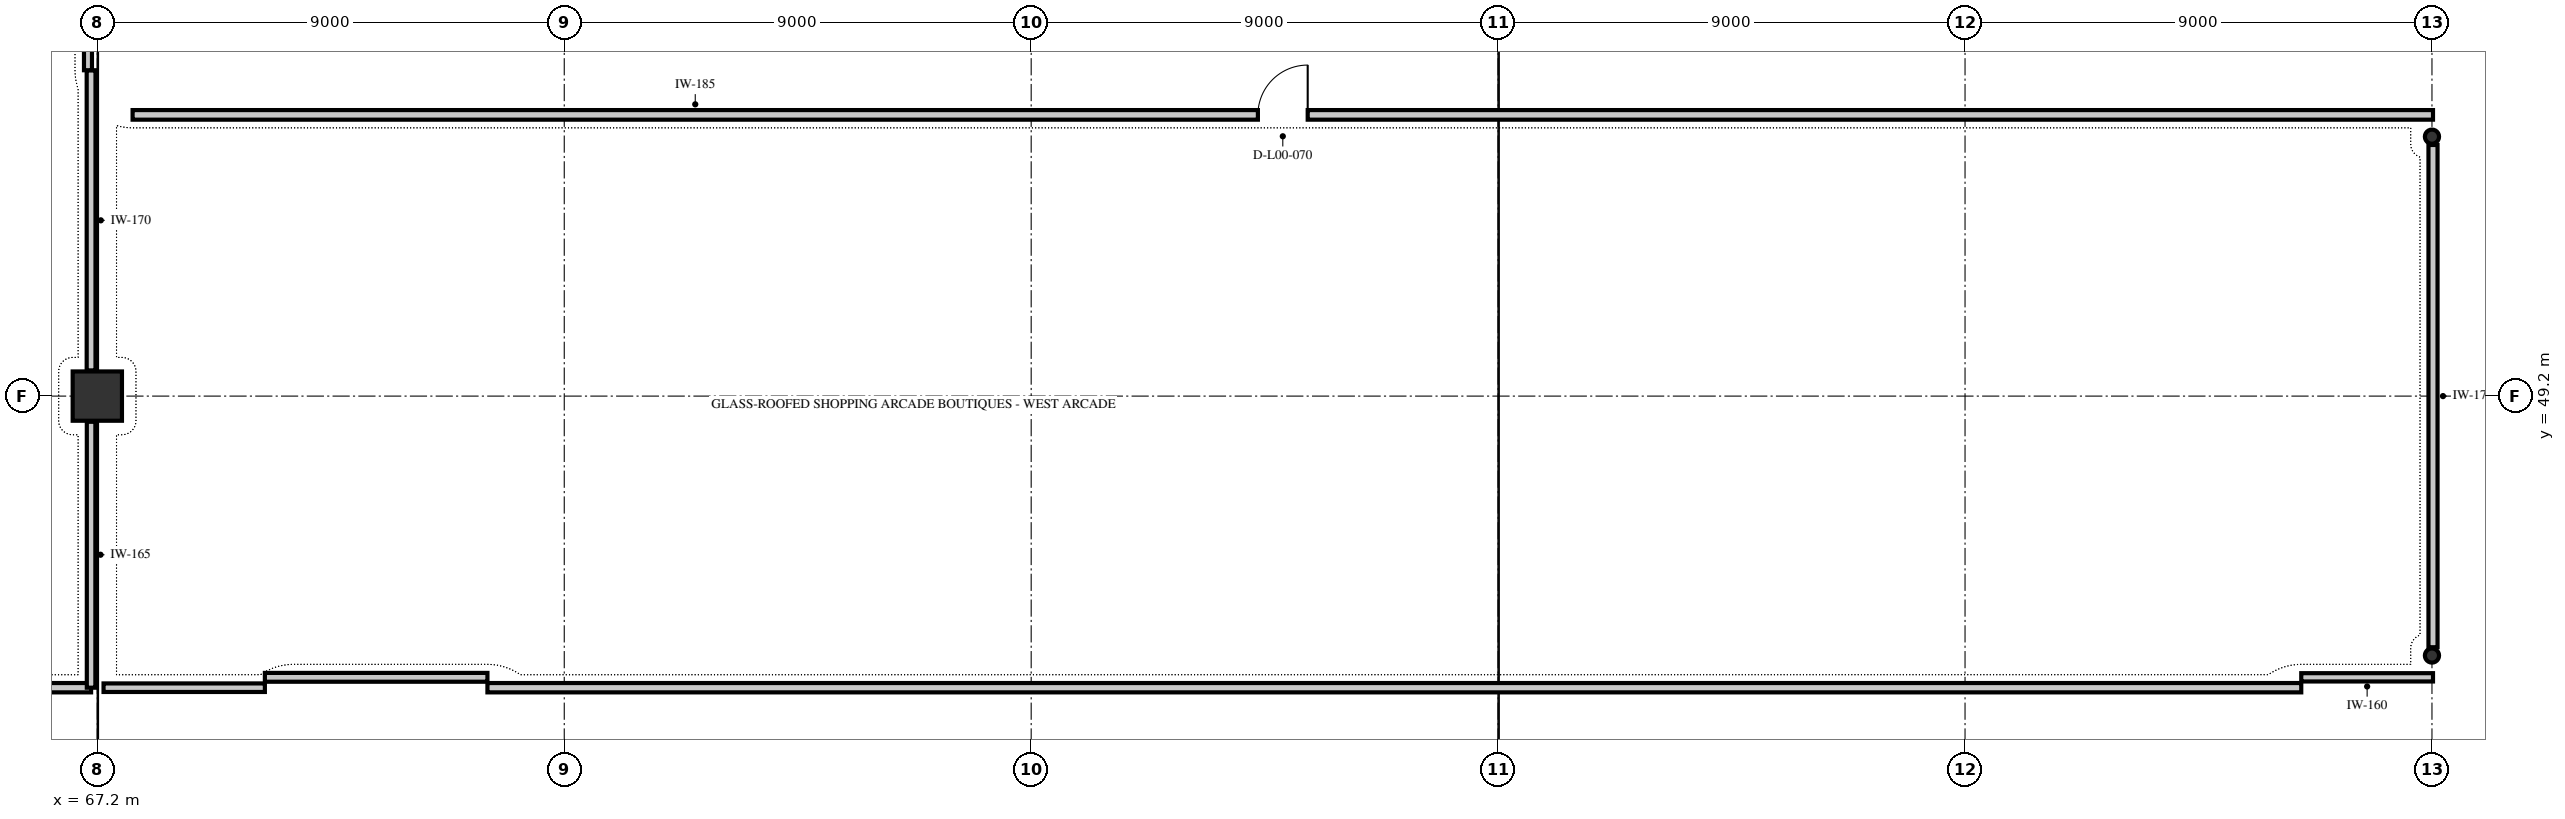
"""IFC4 building model, lengths in metres.
Left out: names, types, materials, properties, quantities, classifications, styles, units other than length and angle.
Written with IfcOpenShell. Run it as: python <this file> out.ifc"""

import sys

from ifc_helpers import new_model, si_unit, direction, frame, frame_2d, origin, origin_2d, place, context, subcontext, project, spatial, rectangle, hollow_circle, extrude, element, fill, save


model = new_model("IFC4")
c1 = context("Model", 3, precision=1e-05, world=origin(), true_north=direction((0.0, 1.0)))
c2 = subcontext(c1, "Body", "Model", "MODEL_VIEW")
j1 = project(units=[si_unit("LENGTHUNIT", "METRE"), si_unit("PLANEANGLEUNIT", "RADIAN")], contexts=[c1])
p1 = place(None, origin())
s1 = spatial("IfcSite", under=j1, at=p1, CompositionType="ELEMENT")
p2 = place(p1, origin())
s2 = spatial("IfcBuilding", under=s1, at=p2, CompositionType="ELEMENT")
p3 = place(p2, origin())
s3 = spatial("IfcBuildingStorey", under=s2, at=p3, CompositionType="ELEMENT", Elevation=0.0)
p4 = place(p3, frame((67.2, 49.2, 0.0), z_axis=(0.0, 0.0, 1.0), x_axis=(1.0, 0.0, 0.0)))
e1 = element("IfcColumn", 1, at=p4, inside=s3, PredefinedType="COLUMN", context=c2, shape_type="SweptSolid", body=[
    extrude(rectangle(XDim=0.95, YDim=0.95, at=origin_2d()), origin(), (0.0, 0.0, 1.0), 5.4),
])
for number, where, z_axis, x_axis in (
    (2, (112.2, 44.2, 0.0), (0.0, 0.0, 1.0), (1.0, 0.0, 0.0)),
    (3, (112.2, 54.2, 0.0), (0.0, 0.0, 1.0), (1.0, 0.0, 0.0)),
):
    element("IfcColumn", number, at=place(p3, frame(where, z_axis=z_axis, x_axis=x_axis)), inside=s3, PredefinedType="COLUMN", context=c2, shape_type="SweptSolid", body=[
        extrude(hollow_circle(Radius=0.136, WallThickness=0.01, at=origin_2d()), origin(), (0.0, 0.0, 1.0), 5.4),
    ])
p5 = place(p3, frame((67.08, 43.58, 0.0), z_axis=(0.0, 0.0, 1.0), x_axis=(-1.0, 0.0, 0.0)))
e4 = element("IfcWall", 4, at=p5, inside=s3, PredefinedType="PARTITIONING", context=c2, shape_type="SweptSolid", body=[
    extrude(rectangle(XDim=18.773, YDim=0.18, at=frame_2d((9.387, 0.0))), origin(), (0.0, 0.0, 1.0), 4.03),
])
p6 = place(p5, frame((8.567, 0.0, 0.0)))
e5 = element("IfcOpeningElement", 5, at=p6, cuts=e4, PredefinedType="OPENING", context=c2, shape_type="SweptSolid", body=[
    extrude(rectangle(XDim=1.64, YDim=2.28, at=frame_2d((0.82, 1.14))), frame((0.0, 0.102, 0.0), z_axis=(0.0, -1.0, 0.0), x_axis=(1.0, 0.0, 0.0)), (0.0, 0.0, 1.0), 0.204),
])
p7 = place(p3, frame((67.08, 55.48, 0.0), z_axis=(0.0, 0.0, 1.0), x_axis=(0.0, -1.0, 0.0)))
e6 = element("IfcWall", 6, at=p7, inside=s3, PredefinedType="PARTITIONING", context=c2, shape_type="SweptSolid", body=[
    extrude(rectangle(XDim=5.785, YDim=0.17, at=frame_2d((2.893, 0.0))), origin(), (0.0, 0.0, 1.0), 4.03),
])
p8 = place(p3, frame((67.08, 48.705, 0.0), z_axis=(0.0, 0.0, 1.0), x_axis=(0.0, -1.0, 0.0)))
e7 = element("IfcWall", 7, at=p8, inside=s3, PredefinedType="PARTITIONING", context=c2, shape_type="SweptSolid", body=[
    extrude(rectangle(XDim=5.125, YDim=0.165, at=frame_2d((2.562, 0.0))), origin(), (0.0, 0.0, 1.0), 4.03),
])
p9 = place(p3, frame((67.02, 59.55, 0.0), z_axis=(0.0, 0.0, 1.0), x_axis=(0.0, -1.0, 0.0)))
e8 = element("IfcWall", 8, at=p9, inside=s3, PredefinedType="PARTITIONING", context=c2, shape_type="SweptSolid", body=[
    extrude(rectangle(XDim=4.07, YDim=0.154, at=frame_2d((2.035, 0.0))), origin(), (0.0, 0.0, 1.0), 4.03),
])
p10 = place(p3, frame((67.88, 54.62, 0.0), z_axis=(0.0, 0.0, 1.0), x_axis=(1.0, 0.0, 0.0)))
e9 = element("IfcWall", 9, at=p10, inside=s3, PredefinedType="PARTITIONING", context=c2, shape_type="SweptSolid", body=[
    extrude(rectangle(XDim=44.34, YDim=0.185, at=frame_2d((22.17, 0.0))), origin(), (0.0, 0.0, 1.0), 5.09),
])
p11 = place(p10, frame((21.69, 0.0, 0.0)))
e10 = element("IfcOpeningElement", 10, at=p11, cuts=e9, PredefinedType="OPENING", context=c2, shape_type="SweptSolid", body=[
    extrude(rectangle(XDim=0.96, YDim=2.13, at=frame_2d((0.48, 1.065))), frame((0.0, 0.104, 0.0), z_axis=(0.0, -1.0, 0.0), x_axis=(1.0, 0.0, 0.0)), (0.0, 0.0, 1.0), 0.209),
])
p12 = place(p3, frame((109.681, 43.58, 0.0), z_axis=(0.0, 0.0, 1.0), x_axis=(-1.0, 0.0, 0.0)))
e11 = element("IfcWall", 11, at=p12, inside=s3, PredefinedType="PARTITIONING", context=c2, shape_type="SweptSolid", body=[
    extrude(rectangle(XDim=34.961, YDim=0.18, at=frame_2d((17.48, 0.0))), origin(), (0.0, 0.0, 1.0), 5.09),
])
p13 = place(p3, frame((112.22, 54.04, 0.0), z_axis=(0.0, 0.0, 1.0), x_axis=(0.0, -1.0, 0.0)))
e12 = element("IfcWall", 12, at=p13, inside=s3, PredefinedType="PARTITIONING", context=c2, shape_type="SweptSolid", body=[
    extrude(rectangle(XDim=9.68, YDim=0.175, at=frame_2d((4.84, 0.0))), origin(), (0.0, 0.0, 1.0), 4.543),
])
p14 = place(p3, frame((74.719, 43.78, 0.0), z_axis=(0.0, 0.0, 1.0), x_axis=(-1.0, 0.0, 0.0)))
e13 = element("IfcWall", 13, at=p14, inside=s3, PredefinedType="PARTITIONING", context=c2, shape_type="SweptSolid", body=[
    extrude(rectangle(XDim=4.29, YDim=0.17, at=frame_2d((2.145, 0.0))), origin(), (0.0, 0.0, 1.0), 5.09),
])
p15 = place(p3, frame((70.43, 43.58, 0.0), z_axis=(0.0, 0.0, 1.0), x_axis=(-1.0, 0.0, 0.0)))
e14 = element("IfcWall", 14, at=p15, inside=s3, PredefinedType="PARTITIONING", context=c2, shape_type="SweptSolid", body=[
    extrude(rectangle(XDim=3.11, YDim=0.165, at=frame_2d((1.555, 0.0))), origin(), (0.0, 0.0, 1.0), 4.03),
])
p16 = place(p3, frame((112.22, 43.78, 0.0), z_axis=(0.0, 0.0, 1.0), x_axis=(-1.0, 0.0, 0.0)))
e15 = element("IfcWall", 15, at=p16, inside=s3, PredefinedType="PARTITIONING", context=c2, shape_type="SweptSolid", body=[
    extrude(rectangle(XDim=2.539, YDim=0.16, at=frame_2d((1.27, 0.0))), origin(), (0.0, 0.0, 1.0), 5.09),
])
p17 = place(p11, origin())
e16 = element("IfcDoor", 16, at=p17, inside=s3, OperationType="SINGLE_SWING_RIGHT", PredefinedType="DOOR", context=c2, shape_type="SweptSolid", body=[
    extrude(rectangle(XDim=0.96, YDim=2.13, at=frame_2d((0.48, 1.065))), frame((0.0, 0.025, 0.0), z_axis=(0.0, -1.0, 0.0), x_axis=(1.0, 0.0, 0.0)), (0.0, 0.0, 1.0), 0.05),
])
fill(e10, e16)
save(model, sys.argv[1])
